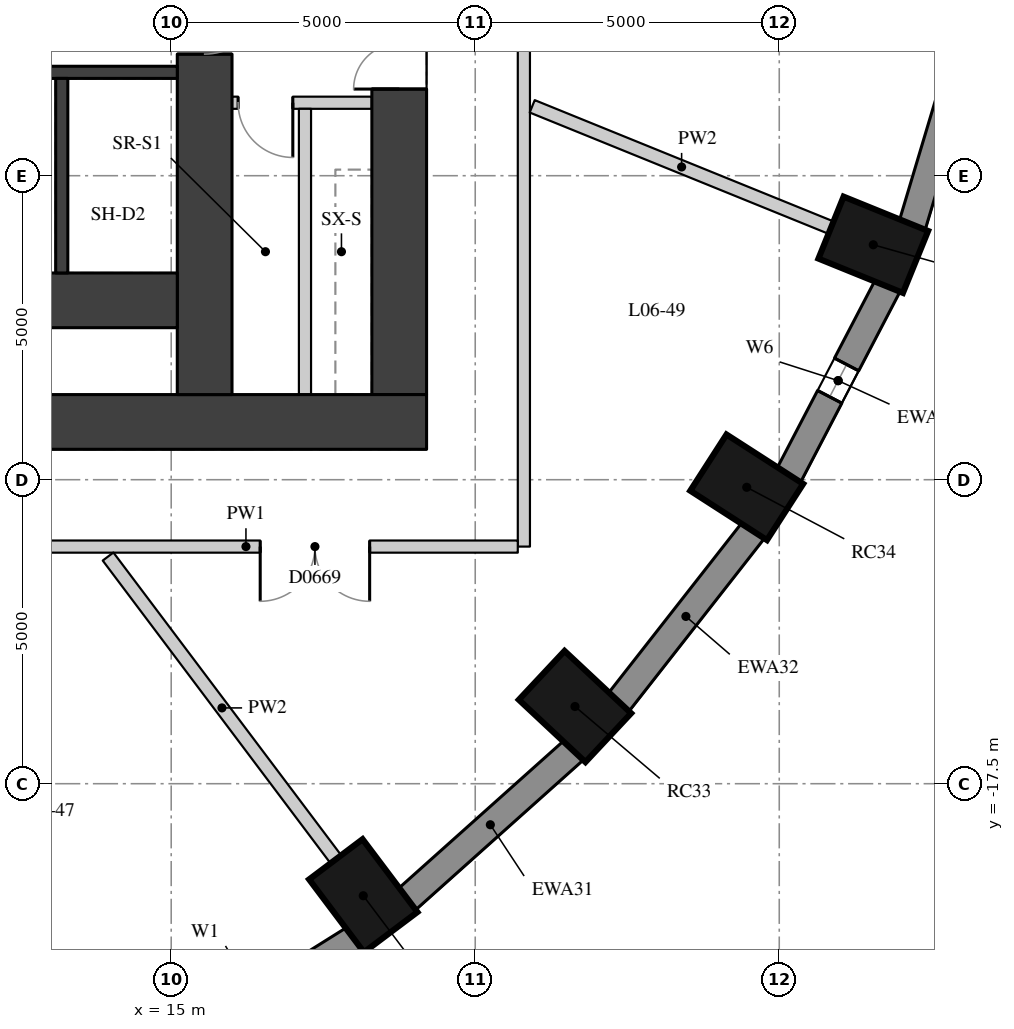
"""IFC4 building model, lengths in metres.
Left out: names, types, materials, properties, quantities, classifications, styles, units other than length and angle.
Written with IfcOpenShell. Run it as: python <this file> out.ifc"""

import sys

from ifc_helpers import new_model, si_unit, direction, frame, frame_2d, origin, origin_2d, place, context, subcontext, project, spatial, rectangle, extrude, element, fill, save


model = new_model("IFC4")
c1 = context("Model", 3, precision=1e-05, world=origin(), true_north=direction((0.0, 1.0)))
c2 = subcontext(c1, "Body", "Model", "MODEL_VIEW")
j1 = project(units=[si_unit("LENGTHUNIT", "METRE"), si_unit("PLANEANGLEUNIT", "RADIAN")], contexts=[c1])
p1 = place(None, origin())
s1 = spatial("IfcSite", under=j1, at=p1, CompositionType="ELEMENT")
p2 = place(p1, origin())
s2 = spatial("IfcBuilding", under=s1, at=p2, CompositionType="ELEMENT")
p3 = place(p2, frame((0.0, 0.0, 28.3)))
s3 = spatial("IfcBuildingStorey", under=s2, at=p3, CompositionType="ELEMENT", Elevation=28.3)
for number, where, z_axis, x_axis in (
    (1, (18.159, -19.343, 0.0), (0.0, 0.0, 1.0), (0.601, -0.799, 0.0)),
    (2, (21.641, -16.23, 0.0), (0.0, 0.0, 1.0), (0.73, -0.683, 0.0)),
    (3, (24.465, -12.625, 0.0), (0.0, 0.0, 1.0), (0.841, -0.541, 0.0)),
    (4, (26.546, -8.636, 0.0), (0.0, 0.0, 1.0), (0.927, -0.376, 0.0)),
):
    element("IfcColumn", number, at=place(p3, frame(where, z_axis=z_axis, x_axis=x_axis)), inside=s3, PredefinedType="COLUMN", context=c2, shape_type="SweptSolid", body=[
        extrude(rectangle(XDim=1.5, YDim=1.1, at=origin_2d()), origin(), (0.0, 0.0, 1.0), 3.3),
    ])
p4 = place(p3, frame((14.817, -22.051, 0.0), z_axis=(0.0, 0.0, 1.0), x_axis=(0.847635480093, 0.530579016629, 0.0)))
e5 = element("IfcWall", 5, at=p4, inside=s3, PredefinedType="SOLIDWALL", context=c2, shape_type="SweptSolid", body=[
    extrude(rectangle(XDim=3.782, YDim=0.45, at=frame_2d((1.891, 0.0))), origin(), (0.0, 0.0, 1.0), 3.02),
])
p5 = place(p4, frame((0.791, 0.0, 0.4)))
e6 = element("IfcOpeningElement", 6, at=p5, cuts=e5, PredefinedType="OPENING", context=c2, shape_type="SweptSolid", body=[
    extrude(rectangle(XDim=2.2, YDim=1.75, at=frame_2d((1.1, 0.875))), frame((0.0, 0.235, 0.0), z_axis=(0.0, -1.0, 0.0), x_axis=(1.0, 0.0, 0.0)), (0.0, 0.0, 1.0), 0.47),
])
p6 = place(p3, frame((18.871, -19.407, 0.0), z_axis=(0.0, 0.0, 1.0), x_axis=(0.745526233716, 0.66647628228, 0.0)))
e7 = element("IfcWall", 7, at=p6, inside=s3, PredefinedType="SOLIDWALL", context=c2, shape_type="SweptSolid", body=[
    extrude(rectangle(XDim=3.697, YDim=0.45, at=frame_2d((1.848, 0.0))), origin(), (0.0, 0.0, 1.0), 3.02),
])
p7 = place(p3, frame((22.352, -16.17, 0.0), z_axis=(0.0, 0.0, 1.0), x_axis=(0.616661975264, 0.787228053529, 0.0)))
e8 = element("IfcWall", 8, at=p7, inside=s3, PredefinedType="SOLIDWALL", context=c2, shape_type="SweptSolid", body=[
    extrude(rectangle(XDim=3.61, YDim=0.45, at=frame_2d((1.805, 0.0))), origin(), (0.0, 0.0, 1.0), 3.02),
])
p8 = place(p3, frame((25.152, -12.437, 0.0), z_axis=(0.0, 0.0, 1.0), x_axis=(0.462492775226, 0.886623050041, 0.0)))
e9 = element("IfcWall", 9, at=p8, inside=s3, PredefinedType="SOLIDWALL", context=c2, shape_type="SweptSolid", body=[
    extrude(rectangle(XDim=3.532, YDim=0.45, at=frame_2d((1.766, 0.0))), origin(), (0.0, 0.0, 1.0), 3.02),
])
p9 = place(p8, frame((1.466, 0.0, 0.4)))
e10 = element("IfcOpeningElement", 10, at=p9, cuts=e9, PredefinedType="OPENING", context=c2, shape_type="SweptSolid", body=[
    extrude(rectangle(XDim=0.6, YDim=1.75, at=frame_2d((0.3, 0.875))), frame((0.0, 0.235, 0.0), z_axis=(0.0, -1.0, 0.0), x_axis=(1.0, 0.0, 0.0)), (0.0, 0.0, 1.0), 0.47),
])
p10 = place(p3, frame((27.185, -8.323, 0.0), z_axis=(0.0, 0.0, 1.0), x_axis=(0.287064133733, 0.957911364963, 0.0)))
e11 = element("IfcWall", 11, at=p10, inside=s3, PredefinedType="SOLIDWALL", context=c2, shape_type="SweptSolid", body=[
    extrude(rectangle(XDim=3.473, YDim=0.45, at=frame_2d((1.737, 0.0))), origin(), (0.0, 0.0, 1.0), 3.02),
])
p11 = place(p3, frame((18.75, -11.1, 0.0), z_axis=(0.0, 0.0, 1.0), x_axis=(0.0, 1.0, 0.0)))
e12 = element("IfcWall", 12, at=p11, inside=s3, PredefinedType="SHEAR", context=c2, shape_type="SweptSolid", body=[
    extrude(rectangle(XDim=22.2, YDim=0.9, at=frame_2d((11.1, 0.0))), origin(), (0.0, 0.0, 1.0), 3.02),
])
p12 = place(p11, frame((16.175, 0.0, 0.0)))
e13 = element("IfcOpeningElement", 13, at=p12, cuts=e12, PredefinedType="OPENING", context=c2, shape_type="SweptSolid", body=[
    extrude(rectangle(XDim=1.5, YDim=2.1, at=frame_2d((0.75, 1.05))), frame((0.0, 0.46, 0.0), z_axis=(0.0, -1.0, 0.0), x_axis=(1.0, 0.0, 0.0)), (0.0, 0.0, 1.0), 0.92),
])
p13 = place(p11, frame((5.025, 0.0, 0.0)))
e14 = element("IfcOpeningElement", 14, at=p13, cuts=e12, PredefinedType="OPENING", context=c2, shape_type="SweptSolid", body=[
    extrude(rectangle(XDim=1.5, YDim=2.1, at=frame_2d((0.75, 1.05))), frame((0.0, 0.46, 0.0), z_axis=(0.0, -1.0, 0.0), x_axis=(1.0, 0.0, 0.0)), (0.0, 0.0, 1.0), 0.92),
])
p14 = place(p3, frame((4.0, -11.55, 0.0), z_axis=(0.0, 0.0, 1.0), x_axis=(1.0, 0.0, 0.0)))
e15 = element("IfcWall", 15, at=p14, inside=s3, PredefinedType="SHEAR", context=c2, shape_type="SweptSolid", body=[
    extrude(rectangle(XDim=15.2, YDim=0.9, at=frame_2d((7.6, 0.0))), origin(), (0.0, 0.0, 1.0), 3.02),
])
p15 = place(p3, frame((15.55, -11.1, 0.0), z_axis=(0.0, 0.0, 1.0), x_axis=(0.0, 1.0, 0.0)))
e16 = element("IfcWall", 16, at=p15, inside=s3, PredefinedType="SHEAR", context=c2, shape_type="SweptSolid", body=[
    extrude(rectangle(XDim=22.2, YDim=0.9, at=frame_2d((11.1, 0.0))), origin(), (0.0, 0.0, 1.0), 3.02),
])
p16 = place(p15, frame((15.6, 0.0, 0.0)))
e17 = element("IfcOpeningElement", 17, at=p16, cuts=e16, PredefinedType="OPENING", context=c2, shape_type="SweptSolid", body=[
    extrude(rectangle(XDim=1.0, YDim=2.1, at=frame_2d((0.5, 1.05))), frame((0.0, 0.46, 0.0), z_axis=(0.0, -1.0, 0.0), x_axis=(1.0, 0.0, 0.0)), (0.0, 0.0, 1.0), 0.92),
])
p17 = place(p15, frame((5.6, 0.0, 0.0)))
e18 = element("IfcOpeningElement", 18, at=p17, cuts=e16, PredefinedType="OPENING", context=c2, shape_type="SweptSolid", body=[
    extrude(rectangle(XDim=1.0, YDim=2.1, at=frame_2d((0.5, 1.05))), frame((0.0, 0.46, 0.0), z_axis=(0.0, -1.0, 0.0), x_axis=(1.0, 0.0, 0.0)), (0.0, 0.0, 1.0), 0.92),
])
p18 = place(p3, frame((4.9, -9.55, 0.0), z_axis=(0.0, 0.0, 1.0), x_axis=(1.0, 0.0, 0.0)))
e19 = element("IfcWall", 19, at=p18, inside=s3, PredefinedType="SHEAR", context=c2, shape_type="SweptSolid", body=[
    extrude(rectangle(XDim=10.2, YDim=0.9, at=frame_2d((5.1, 0.0))), origin(), (0.0, 0.0, 1.0), 3.02),
])
p19 = place(p3, frame((4.9, -5.8, 0.0), z_axis=(0.0, 0.0, 1.0), x_axis=(1.0, 0.0, 0.0)))
e20 = element("IfcWall", 20, at=p19, inside=s3, PredefinedType="SHEAR", context=c2, shape_type="SweptSolid", body=[
    extrude(rectangle(XDim=10.2, YDim=0.2, at=frame_2d((5.1, 0.0))), origin(), (0.0, 0.0, 1.0), 3.02),
])
p20 = place(p3, frame((13.2, -9.1, 0.0), z_axis=(0.0, 0.0, 1.0), x_axis=(0.0, 1.0, 0.0)))
e21 = element("IfcWall", 21, at=p20, inside=s3, PredefinedType="SHEAR", context=c2, shape_type="SweptSolid", body=[
    extrude(rectangle(XDim=3.2, YDim=0.2, at=frame_2d((1.6, 0.0))), origin(), (0.0, 0.0, 1.0), 3.02),
])
p21 = place(p3, frame((16.0, -6.3, 0.0), z_axis=(0.0, 0.0, 1.0), x_axis=(1.0, 0.0, 0.0)))
e22 = element("IfcWall", 22, at=p21, inside=s3, PredefinedType="PARTITIONING", context=c2, shape_type="SweptSolid", body=[
    extrude(rectangle(XDim=2.3, YDim=0.2, at=frame_2d((1.15, 0.0))), origin(), (0.0, 0.0, 1.0), 3.02),
])
p22 = place(p21, frame((0.1, 0.0, 0.0)))
e23 = element("IfcOpeningElement", 23, at=p22, cuts=e22, PredefinedType="OPENING", context=c2, shape_type="SweptSolid", body=[
    extrude(rectangle(XDim=0.9, YDim=2.1, at=frame_2d((0.45, 1.05))), frame((0.0, 0.11, 0.0), z_axis=(0.0, -1.0, 0.0), x_axis=(1.0, 0.0, 0.0)), (0.0, 0.0, 1.0), 0.22),
])
p23 = place(p3, frame((17.2, -11.1, 0.0), z_axis=(0.0, 0.0, 1.0), x_axis=(0.0, 1.0, 0.0)))
e24 = element("IfcWall", 24, at=p23, inside=s3, PredefinedType="PARTITIONING", context=c2, shape_type="SweptSolid", body=[
    extrude(rectangle(XDim=4.7, YDim=0.2, at=frame_2d((2.35, 0.0))), origin(), (0.0, 0.0, 1.0), 3.02),
])
p24 = place(p3, frame((20.8, 13.5, 0.0), z_axis=(0.0, 0.0, 1.0), x_axis=(0.0, -1.0, 0.0)))
e25 = element("IfcWall", 25, at=p24, inside=s3, PredefinedType="PARTITIONING", context=c2, shape_type="SweptSolid", body=[
    extrude(rectangle(XDim=27.1, YDim=0.2, at=frame_2d((13.55, 0.0))), origin(), (0.0, 0.0, 1.0), 3.02),
])
p25 = place(p24, frame((14.149, 0.0, 0.0)))
e26 = element("IfcOpeningElement", 26, at=p25, cuts=e25, PredefinedType="OPENING", context=c2, shape_type="SweptSolid", body=[
    extrude(rectangle(XDim=1.8, YDim=2.1, at=frame_2d((0.9, 1.05))), frame((0.0, 0.11, 0.0), z_axis=(0.0, -1.0, 0.0), x_axis=(1.0, 0.0, 0.0)), (0.0, 0.0, 1.0), 0.22),
])
p26 = place(p24, frame((5.864, 0.0, 0.0)))
e27 = element("IfcOpeningElement", 27, at=p26, cuts=e25, PredefinedType="OPENING", context=c2, shape_type="SweptSolid", body=[
    extrude(rectangle(XDim=1.8, YDim=2.1, at=frame_2d((0.9, 1.05))), frame((0.0, 0.11, 0.0), z_axis=(0.0, -1.0, 0.0), x_axis=(1.0, 0.0, 0.0)), (0.0, 0.0, 1.0), 0.22),
])
p27 = place(p3, frame((20.7, -13.6, 0.0), z_axis=(0.0, 0.0, 1.0), x_axis=(-1.0, 0.0, 0.0)))
e28 = element("IfcWall", 28, at=p27, inside=s3, PredefinedType="PARTITIONING", context=c2, shape_type="SweptSolid", body=[
    extrude(rectangle(XDim=8.941, YDim=0.2, at=frame_2d((4.471, 0.0))), origin(), (0.0, 0.0, 1.0), 3.02),
])
p28 = place(p27, frame((2.436, 0.0, 0.0)))
e29 = element("IfcOpeningElement", 29, at=p28, cuts=e28, PredefinedType="OPENING", context=c2, shape_type="SweptSolid", body=[
    extrude(rectangle(XDim=1.8, YDim=2.1, at=frame_2d((0.9, 1.05))), frame((0.0, 0.11, 0.0), z_axis=(0.0, -1.0, 0.0), x_axis=(1.0, 0.0, 0.0)), (0.0, 0.0, 1.0), 0.22),
])
p29 = place(p3, frame((17.708, -18.743, 0.0), z_axis=(0.0, 0.0, 1.0), x_axis=(-0.601177883261, 0.799115231164, 0.0)))
e30 = element("IfcWall", 30, at=p29, inside=s3, PredefinedType="PARTITIONING", context=c2, shape_type="SweptSolid", body=[
    extrude(rectangle(XDim=6.231, YDim=0.22, at=frame_2d((3.116, 0.0))), origin(), (0.0, 0.0, 1.0), 3.02),
])
p30 = place(p3, frame((25.851, -8.354, 0.0), z_axis=(0.0, 0.0, 1.0), x_axis=(-0.926546814299, 0.376179479653, 0.0)))
e31 = element("IfcWall", 31, at=p30, inside=s3, PredefinedType="PARTITIONING", context=c2, shape_type="SweptSolid", body=[
    extrude(rectangle(XDim=5.304, YDim=0.22, at=frame_2d((2.652, 0.0))), origin(), (0.0, 0.0, 1.0), 3.02),
])
p31 = place(p9, origin())
e32 = element("IfcWindow", 32, at=p31, inside=s3, PartitioningType="SINGLE_PANEL", PredefinedType="WINDOW", context=c2, shape_type="SweptSolid", body=[
    extrude(rectangle(XDim=0.6, YDim=1.75, at=frame_2d((0.3, 0.875))), frame((0.0, 0.035, 0.0), z_axis=(0.0, -1.0, 0.0), x_axis=(1.0, 0.0, 0.0)), (0.0, 0.0, 1.0), 0.06),
])
fill(e10, e32)
p32 = place(p13, origin())
e33 = element("IfcDoor", 33, at=p32, inside=s3, OperationType="DOUBLE_DOOR_SINGLE_SWING", PredefinedType="DOOR", context=c2, shape_type="SweptSolid", body=[
    extrude(rectangle(XDim=1.5, YDim=2.1, at=frame_2d((0.75, 1.05))), frame((0.0, 0.025, 0.0), z_axis=(0.0, -1.0, 0.0), x_axis=(1.0, 0.0, 0.0)), (0.0, 0.0, 1.0), 0.05),
])
fill(e14, e33)
p33 = place(p17, origin())
e34 = element("IfcDoor", 34, at=p33, inside=s3, OperationType="SINGLE_SWING_LEFT", PredefinedType="DOOR", context=c2, shape_type="SweptSolid", body=[
    extrude(rectangle(XDim=1.0, YDim=2.1, at=frame_2d((0.5, 1.05))), frame((0.0, 0.025, 0.0), z_axis=(0.0, -1.0, 0.0), x_axis=(1.0, 0.0, 0.0)), (0.0, 0.0, 1.0), 0.05),
])
fill(e18, e34)
p34 = place(p22, origin())
e35 = element("IfcDoor", 35, at=p34, inside=s3, OperationType="SINGLE_SWING_LEFT", PredefinedType="DOOR", context=c2, shape_type="SweptSolid", body=[
    extrude(rectangle(XDim=0.9, YDim=2.1, at=frame_2d((0.45, 1.05))), frame((0.0, 0.025, 0.0), z_axis=(0.0, -1.0, 0.0), x_axis=(1.0, 0.0, 0.0)), (0.0, 0.0, 1.0), 0.05),
])
fill(e23, e35)
p35 = place(p28, origin())
e36 = element("IfcDoor", 36, at=p35, inside=s3, OperationType="DOUBLE_DOOR_SINGLE_SWING", PredefinedType="DOOR", context=c2, shape_type="SweptSolid", body=[
    extrude(rectangle(XDim=1.8, YDim=2.1, at=frame_2d((0.9, 1.05))), frame((0.0, 0.025, 0.0), z_axis=(0.0, -1.0, 0.0), x_axis=(1.0, 0.0, 0.0)), (0.0, 0.0, 1.0), 0.05),
])
fill(e29, e36)
save(model, sys.argv[1])
